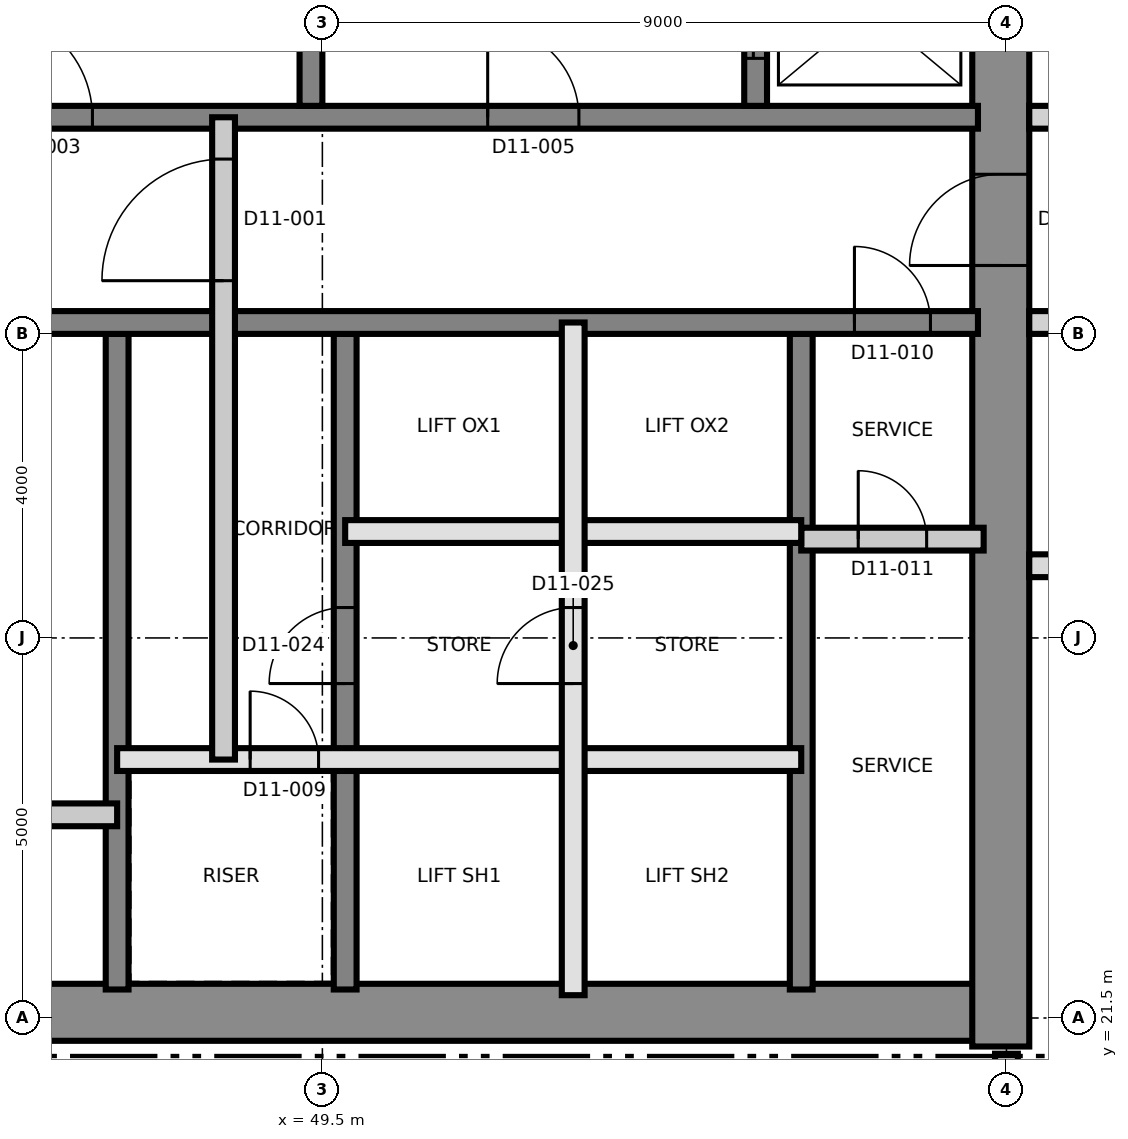
"""IFC4 building model, lengths in metres.
Left out: names, types, materials, properties, quantities, classifications, styles, units other than length and angle.
Written with IfcOpenShell. Run it as: python <this file> out.ifc"""

import sys

from ifc_helpers import new_model, si_unit, direction, frame, frame_2d, origin, place, context, subcontext, project, spatial, rectangle, extrude, element, fill, save


model = new_model("IFC4")
c1 = context("Model", 3, precision=1e-05, world=origin(), true_north=direction((0.0, 1.0)))
c2 = subcontext(c1, "Body", "Model", "MODEL_VIEW")
j1 = project(units=[si_unit("LENGTHUNIT", "METRE"), si_unit("PLANEANGLEUNIT", "RADIAN")], contexts=[c1])
p1 = place(None, origin())
s1 = spatial("IfcSite", under=j1, at=p1, CompositionType="ELEMENT")
p2 = place(p1, origin())
s2 = spatial("IfcBuilding", under=s1, at=p2, CompositionType="ELEMENT")
p3 = place(p2, frame((0.0, 0.0, 124.1)))
s3 = spatial("IfcBuildingStorey", under=s2, at=p3, CompositionType="ELEMENT", Elevation=124.1)
p4 = place(p3, frame((31.125, 21.575, 0.0), z_axis=(0.0, 0.0, 1.0), x_axis=(1.0, 0.0, 0.0)))
e1 = element("IfcWall", 1, at=p4, inside=s3, PredefinedType="SHEAR", context=c2, shape_type="SweptSolid", body=[
    extrude(rectangle(XDim=27.0, YDim=0.75, at=frame_2d((13.5, 0.0))), origin(), (0.0, 0.0, 1.0), 3.7),
])
p5 = place(p3, frame((58.425, 21.125, 0.0), z_axis=(0.0, 0.0, 1.0), x_axis=(0.0, 1.0, 0.0)))
e2 = element("IfcWall", 2, at=p5, inside=s3, PredefinedType="SHEAR", context=c2, shape_type="SweptSolid", body=[
    extrude(rectangle(XDim=18.75, YDim=0.75, at=frame_2d((9.375, 0.0))), origin(), (0.0, 0.0, 1.0), 3.7),
])
p6 = place(p5, frame((10.275, 0.0, 0.0)))
e3 = element("IfcOpeningElement", 3, at=p6, cuts=e2, PredefinedType="OPENING", context=c2, shape_type="SweptSolid", body=[
    extrude(rectangle(XDim=1.2, YDim=2.1, at=frame_2d((0.6, 1.05))), frame((0.0, 0.385, 0.0), z_axis=(0.0, -1.0, 0.0), x_axis=(1.0, 0.0, 0.0)), (0.0, 0.0, 1.0), 0.77),
])
p7 = place(p3, frame((46.8, 21.875, 0.0), z_axis=(0.0, 0.0, 1.0), x_axis=(0.0, 1.0, 0.0)))
e4 = element("IfcWall", 4, at=p7, inside=s3, PredefinedType="SHEAR", context=c2, shape_type="SweptSolid", body=[
    extrude(rectangle(XDim=8.625, YDim=0.3, at=frame_2d((4.312, 0.0))), origin(), (0.0, 0.0, 1.0), 3.7),
])
p8 = place(p3, frame((49.8, 21.875, 0.0), z_axis=(0.0, 0.0, 1.0), x_axis=(0.0, 1.0, 0.0)))
e5 = element("IfcWall", 5, at=p8, inside=s3, PredefinedType="SHEAR", context=c2, shape_type="SweptSolid", body=[
    extrude(rectangle(XDim=8.625, YDim=0.3, at=frame_2d((4.312, 0.0))), origin(), (0.0, 0.0, 1.0), 3.7),
])
p9 = place(p8, frame((4.025, 0.0, 0.0)))
e6 = element("IfcOpeningElement", 6, at=p9, cuts=e5, PredefinedType="OPENING", context=c2, shape_type="SweptSolid", body=[
    extrude(rectangle(XDim=1.0, YDim=2.1, at=frame_2d((0.5, 1.05))), frame((0.0, 0.16, 0.0), z_axis=(0.0, -1.0, 0.0), x_axis=(1.0, 0.0, 0.0)), (0.0, 0.0, 1.0), 0.32),
])
p10 = place(p3, frame((55.8, 21.875, 0.0), z_axis=(0.0, 0.0, 1.0), x_axis=(0.0, 1.0, 0.0)))
e7 = element("IfcWall", 7, at=p10, inside=s3, PredefinedType="SHEAR", context=c2, shape_type="SweptSolid", body=[
    extrude(rectangle(XDim=8.625, YDim=0.3, at=frame_2d((4.312, 0.0))), origin(), (0.0, 0.0, 1.0), 3.7),
])
p11 = place(p3, frame((31.875, 30.65, 0.0), z_axis=(0.0, 0.0, 1.0), x_axis=(1.0, 0.0, 0.0)))
e8 = element("IfcWall", 8, at=p11, inside=s3, PredefinedType="SHEAR", context=c2, shape_type="SweptSolid", body=[
    extrude(rectangle(XDim=26.25, YDim=0.3, at=frame_2d((13.125, 0.0))), origin(), (0.0, 0.0, 1.0), 3.7),
])
p12 = place(p11, frame((24.625, 0.0, 0.0)))
e9 = element("IfcOpeningElement", 9, at=p12, cuts=e8, PredefinedType="OPENING", context=c2, shape_type="SweptSolid", body=[
    extrude(rectangle(XDim=1.0, YDim=2.1, at=frame_2d((0.5, 1.05))), frame((0.0, 0.16, 0.0), z_axis=(0.0, -1.0, 0.0), x_axis=(1.0, 0.0, 0.0)), (0.0, 0.0, 1.0), 0.32),
])
p13 = place(p11, frame((11.425, 0.0, 0.0)))
e10 = element("IfcOpeningElement", 10, at=p13, cuts=e8, PredefinedType="OPENING", context=c2, shape_type="SweptSolid", body=[
    extrude(rectangle(XDim=1.0, YDim=2.1, at=frame_2d((0.5, 1.05))), frame((0.0, 0.16, 0.0), z_axis=(0.0, -1.0, 0.0), x_axis=(1.0, 0.0, 0.0)), (0.0, 0.0, 1.0), 0.32),
])
p14 = place(p3, frame((31.875, 33.35, 0.0), z_axis=(0.0, 0.0, 1.0), x_axis=(1.0, 0.0, 0.0)))
e11 = element("IfcWall", 11, at=p14, inside=s3, PredefinedType="SHEAR", context=c2, shape_type="SweptSolid", body=[
    extrude(rectangle(XDim=26.25, YDim=0.3, at=frame_2d((13.125, 0.0))), origin(), (0.0, 0.0, 1.0), 3.7),
])
p15 = place(p14, frame((13.2, 0.0, 0.0)))
e12 = element("IfcOpeningElement", 12, at=p15, cuts=e11, PredefinedType="OPENING", context=c2, shape_type="SweptSolid", body=[
    extrude(rectangle(XDim=1.4, YDim=2.1, at=frame_2d((0.7, 1.05))), frame((0.0, 0.16, 0.0), z_axis=(0.0, -1.0, 0.0), x_axis=(1.0, 0.0, 0.0)), (0.0, 0.0, 1.0), 0.32),
])
p16 = place(p14, frame((5.25, 0.0, 0.0)))
e13 = element("IfcOpeningElement", 13, at=p16, cuts=e11, PredefinedType="OPENING", context=c2, shape_type="SweptSolid", body=[
    extrude(rectangle(XDim=1.2, YDim=2.1, at=frame_2d((0.6, 1.05))), frame((0.0, 0.16, 0.0), z_axis=(0.0, -1.0, 0.0), x_axis=(1.0, 0.0, 0.0)), (0.0, 0.0, 1.0), 0.32),
])
p17 = place(p14, frame((19.8, 0.0, 0.0)))
e14 = element("IfcOpeningElement", 14, at=p17, cuts=e11, PredefinedType="OPENING", context=c2, shape_type="SweptSolid", body=[
    extrude(rectangle(XDim=1.2, YDim=2.1, at=frame_2d((0.6, 1.05))), frame((0.0, 0.16, 0.0), z_axis=(0.0, -1.0, 0.0), x_axis=(1.0, 0.0, 0.0)), (0.0, 0.0, 1.0), 0.32),
])
p18 = place(p3, frame((49.35, 33.5, 0.0), z_axis=(0.0, 0.0, 1.0), x_axis=(0.0, 1.0, 0.0)))
e15 = element("IfcWall", 15, at=p18, inside=s3, PredefinedType="SHEAR", context=c2, shape_type="SweptSolid", body=[
    extrude(rectangle(XDim=5.625, YDim=0.3, at=frame_2d((2.812, 0.0))), origin(), (0.0, 0.0, 1.0), 3.7),
])
p19 = place(p3, frame((55.2, 33.5, 0.0), z_axis=(0.0, 0.0, 1.0), x_axis=(0.0, 1.0, 0.0)))
e16 = element("IfcWall", 16, at=p19, inside=s3, PredefinedType="SHEAR", context=c2, shape_type="SweptSolid", body=[
    extrude(rectangle(XDim=2.55, YDim=0.3, at=frame_2d((1.275, 0.0))), origin(), (0.0, 0.0, 1.0), 3.7),
])
p20 = place(p19, frame((0.625, 0.0, 0.0)))
e17 = element("IfcOpeningElement", 17, at=p20, cuts=e16, PredefinedType="OPENING", context=c2, shape_type="SweptSolid", body=[
    extrude(rectangle(XDim=1.3, YDim=2.4, at=frame_2d((0.65, 1.2))), frame((0.0, 0.16, 0.0), z_axis=(0.0, -1.0, 0.0), x_axis=(1.0, 0.0, 0.0)), (0.0, 0.0, 1.0), 0.32),
])
p21 = place(p3, frame((40.8, 24.173, 0.0), z_axis=(0.0, 0.0, 1.0), x_axis=(1.0, 0.0, 0.0)))
e18 = element("IfcWall", 18, at=p21, inside=s3, PredefinedType="PARTITIONING", context=c2, shape_type="SweptSolid", body=[
    extrude(rectangle(XDim=6.0, YDim=0.3, at=frame_2d((3.0, 0.0))), origin(), (0.0, 0.0, 1.0), 3.4),
])
p22 = place(p21, frame((2.5, 0.0, 0.0)))
e19 = element("IfcOpeningElement", 19, at=p22, cuts=e18, PredefinedType="OPENING", context=c2, shape_type="SweptSolid", body=[
    extrude(rectangle(XDim=1.0, YDim=2.1, at=frame_2d((0.5, 1.05))), frame((0.0, 0.16, 0.0), z_axis=(0.0, -1.0, 0.0), x_axis=(1.0, 0.0, 0.0)), (0.0, 0.0, 1.0), 0.32),
])
p23 = place(p3, frame((46.8, 24.9, 0.0), z_axis=(0.0, 0.0, 1.0), x_axis=(1.0, 0.0, 0.0)))
e20 = element("IfcWall", 20, at=p23, inside=s3, PredefinedType="SOLIDWALL", context=c2, shape_type="SweptSolid", body=[
    extrude(rectangle(XDim=9.0, YDim=0.3, at=frame_2d((4.5, 0.0))), origin(), (0.0, 0.0, 1.0), 3.4),
])
p24 = place(p23, frame((1.75, 0.0, 0.0)))
e21 = element("IfcOpeningElement", 21, at=p24, cuts=e20, PredefinedType="OPENING", context=c2, shape_type="SweptSolid", body=[
    extrude(rectangle(XDim=0.9, YDim=2.1, at=frame_2d((0.45, 1.05))), frame((0.0, 0.16, 0.0), z_axis=(0.0, -1.0, 0.0), x_axis=(1.0, 0.0, 0.0)), (0.0, 0.0, 1.0), 0.32),
])
p25 = place(p3, frame((55.8, 27.8, 0.0), z_axis=(0.0, 0.0, 1.0), x_axis=(1.0, 0.0, 0.0)))
e22 = element("IfcWall", 22, at=p25, inside=s3, PredefinedType="PARTITIONING", context=c2, shape_type="SweptSolid", body=[
    extrude(rectangle(XDim=2.4, YDim=0.3, at=frame_2d((1.2, 0.0))), origin(), (0.0, 0.0, 1.0), 3.4),
])
p26 = place(p25, frame((0.75, 0.0, 0.0)))
e23 = element("IfcOpeningElement", 23, at=p26, cuts=e22, PredefinedType="OPENING", context=c2, shape_type="SweptSolid", body=[
    extrude(rectangle(XDim=0.9, YDim=2.1, at=frame_2d((0.45, 1.05))), frame((0.0, 0.16, 0.0), z_axis=(0.0, -1.0, 0.0), x_axis=(1.0, 0.0, 0.0)), (0.0, 0.0, 1.0), 0.32),
])
p27 = place(p3, frame((49.8, 27.9, 0.0), z_axis=(0.0, 0.0, 1.0), x_axis=(1.0, 0.0, 0.0)))
e24 = element("IfcWall", 24, at=p27, inside=s3, PredefinedType="SOLIDWALL", context=c2, shape_type="SweptSolid", body=[
    extrude(rectangle(XDim=6.0, YDim=0.3, at=frame_2d((3.0, 0.0))), origin(), (0.0, 0.0, 1.0), 3.4),
])
p28 = place(p3, frame((48.2, 24.9, 0.0), z_axis=(0.0, 0.0, 1.0), x_axis=(0.0, 1.0, 0.0)))
e25 = element("IfcWall", 25, at=p28, inside=s3, PredefinedType="PARTITIONING", context=c2, shape_type="SweptSolid", body=[
    extrude(rectangle(XDim=8.45, YDim=0.3, at=frame_2d((4.225, 0.0))), origin(), (0.0, 0.0, 1.0), 3.4),
])
p29 = place(p28, frame((6.3, 0.0, 0.0)))
e26 = element("IfcOpeningElement", 26, at=p29, cuts=e25, PredefinedType="OPENING", context=c2, shape_type="SweptSolid", body=[
    extrude(rectangle(XDim=1.6, YDim=2.1, at=frame_2d((0.8, 1.05))), frame((0.0, 0.16, 0.0), z_axis=(0.0, -1.0, 0.0), x_axis=(1.0, 0.0, 0.0)), (0.0, 0.0, 1.0), 0.32),
])
p30 = place(p3, frame((52.8, 21.8, 0.0), z_axis=(0.0, 0.0, 1.0), x_axis=(0.0, 1.0, 0.0)))
e27 = element("IfcWall", 27, at=p30, inside=s3, PredefinedType="SOLIDWALL", context=c2, shape_type="SweptSolid", body=[
    extrude(rectangle(XDim=8.85, YDim=0.3, at=frame_2d((4.425, 0.0))), origin(), (0.0, 0.0, 1.0), 3.4),
])
p31 = place(p30, frame((4.1, 0.0, 0.0)))
e28 = element("IfcOpeningElement", 28, at=p31, cuts=e27, PredefinedType="OPENING", context=c2, shape_type="SweptSolid", body=[
    extrude(rectangle(XDim=1.0, YDim=2.1, at=frame_2d((0.5, 1.05))), frame((0.0, 0.16, 0.0), z_axis=(0.0, -1.0, 0.0), x_axis=(1.0, 0.0, 0.0)), (0.0, 0.0, 1.0), 0.32),
])
p32 = place(p3, frame((58.8, 27.45, 0.0), z_axis=(0.0, 0.0, 1.0), x_axis=(1.0, 0.0, 0.0)))
e29 = element("IfcWall", 29, at=p32, inside=s3, PredefinedType="PARTITIONING", context=c2, shape_type="SweptSolid", body=[
    extrude(rectangle(XDim=2.4, YDim=0.3, at=frame_2d((1.2, 0.0))), origin(), (0.0, 0.0, 1.0), 3.4),
])
p33 = place(p32, frame((0.65, 0.0, 0.0)))
e30 = element("IfcOpeningElement", 30, at=p33, cuts=e29, PredefinedType="OPENING", context=c2, shape_type="SweptSolid", body=[
    extrude(rectangle(XDim=0.8, YDim=2.1, at=frame_2d((0.4, 1.05))), frame((0.0, 0.16, 0.0), z_axis=(0.0, -1.0, 0.0), x_axis=(1.0, 0.0, 0.0)), (0.0, 0.0, 1.0), 0.32),
])
p34 = place(p3, frame((58.8, 30.65, 0.0), z_axis=(0.0, 0.0, 1.0), x_axis=(1.0, 0.0, 0.0)))
e31 = element("IfcWall", 31, at=p34, inside=s3, PredefinedType="PARTITIONING", context=c2, shape_type="SweptSolid", body=[
    extrude(rectangle(XDim=26.53, YDim=0.3, at=frame_2d((13.265, 0.0))), origin(), (0.0, 0.0, 1.0), 3.4),
])
p35 = place(p34, frame((3.115, 0.0, 0.0)))
e32 = element("IfcOpeningElement", 32, at=p35, cuts=e31, PredefinedType="OPENING", context=c2, shape_type="SweptSolid", body=[
    extrude(rectangle(XDim=1.0, YDim=2.1, at=frame_2d((0.5, 1.05))), frame((0.0, 0.16, 0.0), z_axis=(0.0, -1.0, 0.0), x_axis=(1.0, 0.0, 0.0)), (0.0, 0.0, 1.0), 0.32),
])
p36 = place(p34, frame((6.065, 0.0, 0.0)))
e33 = element("IfcOpeningElement", 33, at=p36, cuts=e31, PredefinedType="OPENING", context=c2, shape_type="SweptSolid", body=[
    extrude(rectangle(XDim=1.4, YDim=2.1, at=frame_2d((0.7, 1.05))), frame((0.0, 0.16, 0.0), z_axis=(0.0, -1.0, 0.0), x_axis=(1.0, 0.0, 0.0)), (0.0, 0.0, 1.0), 0.32),
])
p37 = place(p34, frame((12.7, 0.0, 0.0)))
e34 = element("IfcOpeningElement", 34, at=p37, cuts=e31, PredefinedType="OPENING", context=c2, shape_type="SweptSolid", body=[
    extrude(rectangle(XDim=1.0, YDim=2.4, at=frame_2d((0.5, 1.2))), frame((0.0, 0.16, 0.0), z_axis=(0.0, -1.0, 0.0), x_axis=(1.0, 0.0, 0.0)), (0.0, 0.0, 1.0), 0.32),
])
p38 = place(p34, frame((18.85, 0.0, 0.0)))
e35 = element("IfcOpeningElement", 35, at=p38, cuts=e31, PredefinedType="OPENING", context=c2, shape_type="SweptSolid", body=[
    extrude(rectangle(XDim=1.0, YDim=2.1, at=frame_2d((0.5, 1.05))), frame((0.0, 0.16, 0.0), z_axis=(0.0, -1.0, 0.0), x_axis=(1.0, 0.0, 0.0)), (0.0, 0.0, 1.0), 0.32),
])
p39 = place(p34, frame((24.7, 0.0, 0.0)))
e36 = element("IfcOpeningElement", 36, at=p39, cuts=e31, PredefinedType="OPENING", context=c2, shape_type="SweptSolid", body=[
    extrude(rectangle(XDim=1.0, YDim=2.1, at=frame_2d((0.5, 1.05))), frame((0.0, 0.16, 0.0), z_axis=(0.0, -1.0, 0.0), x_axis=(1.0, 0.0, 0.0)), (0.0, 0.0, 1.0), 0.32),
])
p40 = place(p3, frame((58.8, 33.35, 0.0), z_axis=(0.0, 0.0, 1.0), x_axis=(1.0, 0.0, 0.0)))
e37 = element("IfcWall", 37, at=p40, inside=s3, PredefinedType="PARTITIONING", context=c2, shape_type="SweptSolid", body=[
    extrude(rectangle(XDim=26.53, YDim=0.3, at=frame_2d((13.265, 0.0))), origin(), (0.0, 0.0, 1.0), 3.4),
])
p41 = place(p40, frame((0.835, 0.0, 0.0)))
e38 = element("IfcOpeningElement", 38, at=p41, cuts=e37, PredefinedType="OPENING", context=c2, shape_type="SweptSolid", body=[
    extrude(rectangle(XDim=1.2, YDim=2.1, at=frame_2d((0.6, 1.05))), frame((0.0, 0.16, 0.0), z_axis=(0.0, -1.0, 0.0), x_axis=(1.0, 0.0, 0.0)), (0.0, 0.0, 1.0), 0.32),
])
p42 = place(p40, frame((4.085, 0.0, 0.0)))
e39 = element("IfcOpeningElement", 39, at=p42, cuts=e37, PredefinedType="OPENING", context=c2, shape_type="SweptSolid", body=[
    extrude(rectangle(XDim=1.0, YDim=2.1, at=frame_2d((0.5, 1.05))), frame((0.0, 0.16, 0.0), z_axis=(0.0, -1.0, 0.0), x_axis=(1.0, 0.0, 0.0)), (0.0, 0.0, 1.0), 0.32),
])
p43 = place(p40, frame((12.7, 0.0, 0.0)))
e40 = element("IfcOpeningElement", 40, at=p43, cuts=e37, PredefinedType="OPENING", context=c2, shape_type="SweptSolid", body=[
    extrude(rectangle(XDim=1.0, YDim=2.4, at=frame_2d((0.5, 1.2))), frame((0.0, 0.16, 0.0), z_axis=(0.0, -1.0, 0.0), x_axis=(1.0, 0.0, 0.0)), (0.0, 0.0, 1.0), 0.32),
])
p44 = place(p40, frame((21.115, 0.0, 0.0)))
e41 = element("IfcOpeningElement", 41, at=p44, cuts=e37, PredefinedType="OPENING", context=c2, shape_type="SweptSolid", body=[
    extrude(rectangle(XDim=1.0, YDim=2.1, at=frame_2d((0.5, 1.05))), frame((0.0, 0.16, 0.0), z_axis=(0.0, -1.0, 0.0), x_axis=(1.0, 0.0, 0.0)), (0.0, 0.0, 1.0), 0.32),
])
p45 = place(p40, frame((24.065, 0.0, 0.0)))
e42 = element("IfcOpeningElement", 42, at=p45, cuts=e37, PredefinedType="OPENING", context=c2, shape_type="SweptSolid", body=[
    extrude(rectangle(XDim=1.4, YDim=2.1, at=frame_2d((0.7, 1.05))), frame((0.0, 0.16, 0.0), z_axis=(0.0, -1.0, 0.0), x_axis=(1.0, 0.0, 0.0)), (0.0, 0.0, 1.0), 0.32),
])
p46 = place(p3, frame((58.5, 20.135, 0.0), z_axis=(0.0, 0.0, 1.0), x_axis=(0.0, 1.0, 0.0)))
e43 = element("IfcWall", 43, at=p46, inside=s3, PredefinedType="PARTITIONING", context=c2, shape_type="SweptSolid", body=[
    extrude(rectangle(XDim=0.895, YDim=0.3, at=frame_2d((0.448, 0.0))), origin(), (0.0, 0.0, 1.0), 3.4),
])
p47 = place(p29, origin())
e44 = element("IfcDoor", 44, at=p47, inside=s3, OperationType="SINGLE_SWING_LEFT", PredefinedType="DOOR", context=c2, shape_type="SweptSolid", body=[
    extrude(rectangle(XDim=1.6, YDim=2.1, at=frame_2d((0.8, 1.05))), frame((0.0, 0.025, 0.0), z_axis=(0.0, -1.0, 0.0), x_axis=(1.0, 0.0, 0.0)), (0.0, 0.0, 1.0), 0.05),
])
fill(e26, e44)
p48 = place(p15, origin())
e45 = element("IfcDoor", 45, at=p48, inside=s3, OperationType="SINGLE_SWING_RIGHT", PredefinedType="DOOR", context=c2, shape_type="SweptSolid", body=[
    extrude(rectangle(XDim=1.4, YDim=2.1, at=frame_2d((0.7, 1.05))), frame((0.0, 0.025, 0.0), z_axis=(0.0, -1.0, 0.0), x_axis=(1.0, 0.0, 0.0)), (0.0, 0.0, 1.0), 0.05),
])
fill(e12, e45)
p49 = place(p17, origin())
e46 = element("IfcDoor", 46, at=p49, inside=s3, OperationType="SINGLE_SWING_RIGHT", PredefinedType="DOOR", context=c2, shape_type="SweptSolid", body=[
    extrude(rectangle(XDim=1.2, YDim=2.1, at=frame_2d((0.6, 1.05))), frame((0.0, 0.025, 0.0), z_axis=(0.0, -1.0, 0.0), x_axis=(1.0, 0.0, 0.0)), (0.0, 0.0, 1.0), 0.05),
])
fill(e14, e46)
p50 = place(p24, origin())
e47 = element("IfcDoor", 47, at=p50, inside=s3, OperationType="SINGLE_SWING_RIGHT", PredefinedType="DOOR", context=c2, shape_type="SweptSolid", body=[
    extrude(rectangle(XDim=0.9, YDim=2.1, at=frame_2d((0.45, 1.05))), frame((0.0, 0.025, 0.0), z_axis=(0.0, -1.0, 0.0), x_axis=(1.0, 0.0, 0.0)), (0.0, 0.0, 1.0), 0.05),
])
fill(e21, e47)
p51 = place(p12, origin())
e48 = element("IfcDoor", 48, at=p51, inside=s3, OperationType="SINGLE_SWING_LEFT", PredefinedType="DOOR", context=c2, shape_type="SweptSolid", body=[
    extrude(rectangle(XDim=1.0, YDim=2.1, at=frame_2d((0.5, 1.05))), frame((0.0, 0.025, 0.0), z_axis=(0.0, -1.0, 0.0), x_axis=(1.0, 0.0, 0.0)), (0.0, 0.0, 1.0), 0.05),
])
fill(e9, e48)
p52 = place(p26, origin())
e49 = element("IfcDoor", 49, at=p52, inside=s3, OperationType="SINGLE_SWING_RIGHT", PredefinedType="DOOR", context=c2, shape_type="SweptSolid", body=[
    extrude(rectangle(XDim=0.9, YDim=2.1, at=frame_2d((0.45, 1.05))), frame((0.0, 0.025, 0.0), z_axis=(0.0, -1.0, 0.0), x_axis=(1.0, 0.0, 0.0)), (0.0, 0.0, 1.0), 0.05),
])
fill(e23, e49)
p53 = place(p6, origin())
e50 = element("IfcDoor", 50, at=p53, inside=s3, OperationType="SINGLE_SWING_LEFT", PredefinedType="DOOR", context=c2, shape_type="SweptSolid", body=[
    extrude(rectangle(XDim=1.2, YDim=2.1, at=frame_2d((0.6, 1.05))), frame((0.0, 0.025, 0.0), z_axis=(0.0, -1.0, 0.0), x_axis=(1.0, 0.0, 0.0)), (0.0, 0.0, 1.0), 0.05),
])
fill(e3, e50)
p54 = place(p20, origin())
e51 = element("IfcDoor", 51, at=p54, inside=s3, OperationType="SLIDING_TO_LEFT", PredefinedType="DOOR", context=c2, shape_type="SweptSolid", body=[
    extrude(rectangle(XDim=1.3, YDim=2.4, at=frame_2d((0.65, 1.2))), frame((0.0, 0.025, 0.0), z_axis=(0.0, -1.0, 0.0), x_axis=(1.0, 0.0, 0.0)), (0.0, 0.0, 1.0), 0.05),
])
fill(e17, e51)
p55 = place(p9, origin())
e52 = element("IfcDoor", 52, at=p55, inside=s3, OperationType="SINGLE_SWING_LEFT", PredefinedType="DOOR", context=c2, shape_type="SweptSolid", body=[
    extrude(rectangle(XDim=1.0, YDim=2.1, at=frame_2d((0.5, 1.05))), frame((0.0, 0.025, 0.0), z_axis=(0.0, -1.0, 0.0), x_axis=(1.0, 0.0, 0.0)), (0.0, 0.0, 1.0), 0.05),
])
fill(e6, e52)
p56 = place(p31, origin())
e53 = element("IfcDoor", 53, at=p56, inside=s3, OperationType="SINGLE_SWING_RIGHT", PredefinedType="DOOR", context=c2, shape_type="SweptSolid", body=[
    extrude(rectangle(XDim=1.0, YDim=2.1, at=frame_2d((0.5, 1.05))), frame((0.0, 0.025, 0.0), z_axis=(0.0, -1.0, 0.0), x_axis=(1.0, 0.0, 0.0)), (0.0, 0.0, 1.0), 0.05),
])
fill(e28, e53)
save(model, sys.argv[1])
